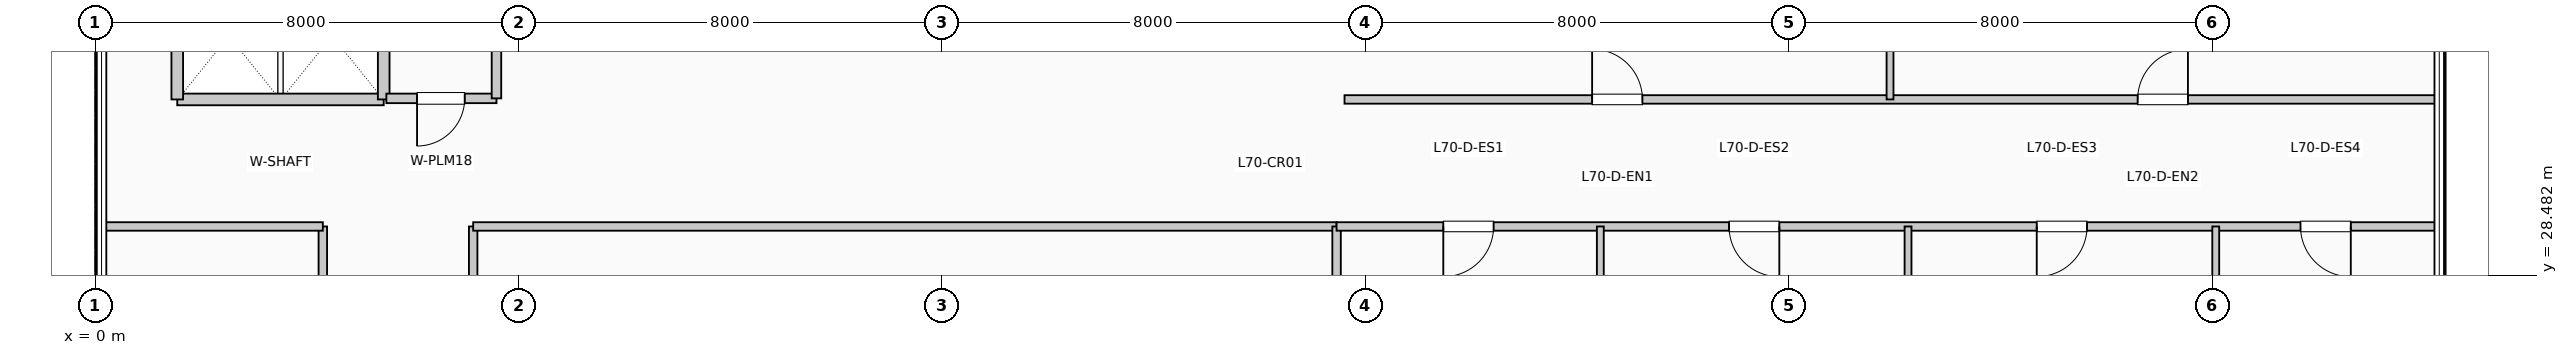
"""IFC4 building model, lengths in metres.
Left out: names, types, materials, properties, quantities, classifications, styles, units other than length and angle.
Written with IfcOpenShell. Run it as: python <this file> out.ifc"""

import sys

from ifc_helpers import new_model, si_unit, direction, frame, frame_2d, origin, place, context, subcontext, project, spatial, rectangle, extrude, element, fill, save


model = new_model("IFC4")
c1 = context("Model", 3, precision=1e-05, world=origin(), true_north=direction((0.0, 1.0)))
c2 = subcontext(c1, "Body", "Model", "MODEL_VIEW")
j1 = project(units=[si_unit("LENGTHUNIT", "METRE"), si_unit("PLANEANGLEUNIT", "RADIAN")], contexts=[c1])
p1 = place(None, origin())
s1 = spatial("IfcSite", under=j1, at=p1, CompositionType="ELEMENT")
p2 = place(p1, origin())
s2 = spatial("IfcBuilding", under=s1, at=p2, CompositionType="ELEMENT")
p3 = place(p2, frame((0.0, 0.0, 288.09)))
s3 = spatial("IfcBuildingStorey", under=s2, at=p3, CompositionType="ELEMENT", Elevation=288.09)
p4 = place(p3, frame((1.55, 31.8, 0.0), z_axis=(0.0, 0.0, 1.0), x_axis=(1.0, 0.0, 0.0)))
e1 = element("IfcWall", 1, at=p4, inside=s3, PredefinedType="PARTITIONING", context=c2, shape_type="SweptSolid", body=[
    extrude(rectangle(XDim=3.9, YDim=0.22, at=frame_2d((1.95, 0.0))), origin(), (0.0, 0.0, 1.0), 3.74),
])
for number, where, z_axis, x_axis in (
    (2, (1.55, 31.8, 0.0), (0.0, 0.0, 1.0), (0.0, 1.0, 0.0)),
    (3, (5.45, 31.8, 0.0), (0.0, 0.0, 1.0), (0.0, 1.0, 0.0)),
):
    element("IfcWall", number, at=place(p3, frame(where, z_axis=z_axis, x_axis=x_axis)), inside=s3, PredefinedType="PARTITIONING", context=c2, shape_type="SweptSolid", body=[
        extrude(rectangle(XDim=2.38, YDim=0.22, at=frame_2d((1.19, 0.0))), origin(), (0.0, 0.0, 1.0), 3.74),
    ])
p5 = place(p3, frame((5.5, 31.82, 0.0), z_axis=(0.0, 0.0, 1.0), x_axis=(1.0, 0.0, 0.0)))
e4 = element("IfcWall", 4, at=p5, inside=s3, PredefinedType="PLUMBINGWALL", context=c2, shape_type="SweptSolid", body=[
    extrude(rectangle(XDim=2.08, YDim=0.18, at=frame_2d((1.04, 0.0))), origin(), (0.0, 0.0, 1.0), 3.74),
])
p6 = place(p5, frame((1.48, 0.0, 0.0), z_axis=(0.0, 0.0, 1.0), x_axis=(-1.0, 0.0, 0.0)))
e5 = element("IfcOpeningElement", 5, at=p6, cuts=e4, PredefinedType="OPENING", context=c2, shape_type="SweptSolid", body=[
    extrude(rectangle(XDim=0.9, YDim=2.1, at=frame_2d((0.45, 1.05))), frame((0.0, 0.1, 0.0), z_axis=(0.0, -1.0, 0.0), x_axis=(1.0, 0.0, 0.0)), (0.0, 0.0, 1.0), 0.2),
])
p7 = place(p3, frame((7.58, 31.82, 0.0), z_axis=(0.0, 0.0, 1.0), x_axis=(0.0, 1.0, 0.0)))
e6 = element("IfcWall", 6, at=p7, inside=s3, PredefinedType="PLUMBINGWALL", context=c2, shape_type="SweptSolid", body=[
    extrude(rectangle(XDim=2.36, YDim=0.18, at=frame_2d((1.18, 0.0))), origin(), (0.0, 0.0, 1.0), 3.74),
])
p8 = place(p3, frame((4.3, 12.8, 0.0), z_axis=(0.0, 0.0, 1.0), x_axis=(0.0, 1.0, 0.0)))
e7 = element("IfcWall", 7, at=p8, inside=s3, PredefinedType="PARTITIONING", context=c2, shape_type="SweptSolid", body=[
    extrude(rectangle(XDim=16.6, YDim=0.16, at=frame_2d((8.3, 0.0))), origin(), (0.0, 0.0, 1.0), 3.74),
])
p9 = place(p8, frame((8.775, 0.0, 0.0), z_axis=(0.0, 0.0, 1.0), x_axis=(-1.0, 0.0, 0.0)))
e8 = element("IfcOpeningElement", 8, at=p9, cuts=e7, PredefinedType="OPENING", context=c2, shape_type="SweptSolid", body=[
    extrude(rectangle(XDim=0.95, YDim=2.15, at=frame_2d((0.475, 1.075))), frame((0.0, 0.09, 0.0), z_axis=(0.0, -1.0, 0.0), x_axis=(1.0, 0.0, 0.0)), (0.0, 0.0, 1.0), 0.18),
])
p10 = place(p3, frame((7.14, 12.8, 0.0), z_axis=(0.0, 0.0, 1.0), x_axis=(0.0, 1.0, 0.0)))
e9 = element("IfcWall", 9, at=p10, inside=s3, PredefinedType="PARTITIONING", context=c2, shape_type="SweptSolid", body=[
    extrude(rectangle(XDim=16.6, YDim=0.16, at=frame_2d((8.3, 0.0))), origin(), (0.0, 0.0, 1.0), 3.74),
])
p11 = place(p10, frame((1.849, 0.0, 0.0)))
e10 = element("IfcOpeningElement", 10, at=p11, cuts=e9, PredefinedType="OPENING", context=c2, shape_type="SweptSolid", body=[
    extrude(rectangle(XDim=0.95, YDim=2.15, at=frame_2d((0.475, 1.075))), frame((0.0, 0.09, 0.0), z_axis=(0.0, -1.0, 0.0), x_axis=(1.0, 0.0, 0.0)), (0.0, 0.0, 1.0), 0.18),
])
p12 = place(p10, frame((6.829, 0.0, 0.0)))
e11 = element("IfcOpeningElement", 11, at=p12, cuts=e9, PredefinedType="OPENING", context=c2, shape_type="SweptSolid", body=[
    extrude(rectangle(XDim=0.95, YDim=2.15, at=frame_2d((0.475, 1.075))), frame((0.0, 0.09, 0.0), z_axis=(0.0, -1.0, 0.0), x_axis=(1.0, 0.0, 0.0)), (0.0, 0.0, 1.0), 0.18),
])
p13 = place(p10, frame((12.805, 0.0, 0.0)))
e12 = element("IfcOpeningElement", 12, at=p13, cuts=e9, PredefinedType="OPENING", context=c2, shape_type="SweptSolid", body=[
    extrude(rectangle(XDim=0.95, YDim=2.15, at=frame_2d((0.475, 1.075))), frame((0.0, 0.09, 0.0), z_axis=(0.0, -1.0, 0.0), x_axis=(1.0, 0.0, 0.0)), (0.0, 0.0, 1.0), 0.18),
])
p14 = place(p3, frame((0.19, 29.4, 0.0), z_axis=(0.0, 0.0, 1.0), x_axis=(1.0, 0.0, 0.0)))
e13 = element("IfcWall", 13, at=p14, inside=s3, PredefinedType="PARTITIONING", context=c2, shape_type="SweptSolid", body=[
    extrude(rectangle(XDim=4.11, YDim=0.16, at=frame_2d((2.055, 0.0))), origin(), (0.0, 0.0, 1.0), 3.425),
])
p15 = place(p3, frame((7.14, 29.4, 0.0), z_axis=(0.0, 0.0, 1.0), x_axis=(1.0, 0.0, 0.0)))
e14 = element("IfcWall", 14, at=p15, inside=s3, PredefinedType="PARTITIONING", context=c2, shape_type="SweptSolid", body=[
    extrude(rectangle(XDim=16.31, YDim=0.16, at=frame_2d((8.155, 0.0))), origin(), (0.0, 0.0, 1.0), 3.425),
])
p16 = place(p3, frame((23.45, 5.99, 0.0), z_axis=(0.0, 0.0, 1.0), x_axis=(0.0, 1.0, 0.0)))
e15 = element("IfcWall", 15, at=p16, inside=s3, PredefinedType="PARTITIONING", context=c2, shape_type="SweptSolid", body=[
    extrude(rectangle(XDim=23.41, YDim=0.16, at=frame_2d((11.705, 0.0))), origin(), (0.0, 0.0, 1.0), 3.175),
])
p17 = place(p3, frame((23.45, 29.4, 0.0), z_axis=(0.0, 0.0, 1.0), x_axis=(1.0, 0.0, 0.0)))
e16 = element("IfcWall", 16, at=p17, inside=s3, PredefinedType="PARTITIONING", context=c2, shape_type="SweptSolid", body=[
    extrude(rectangle(XDim=20.76, YDim=0.16, at=frame_2d((10.38, 0.0))), origin(), (0.0, 0.0, 1.0), 3.425),
])
p18 = place(p17, frame((2.966, 0.0, 0.0), z_axis=(0.0, 0.0, 1.0), x_axis=(-1.0, 0.0, 0.0)))
e17 = element("IfcOpeningElement", 17, at=p18, cuts=e16, PredefinedType="OPENING", context=c2, shape_type="SweptSolid", body=[
    extrude(rectangle(XDim=0.95, YDim=2.15, at=frame_2d((0.475, 1.075))), frame((0.0, 0.09, 0.0), z_axis=(0.0, -1.0, 0.0), x_axis=(1.0, 0.0, 0.0)), (0.0, 0.0, 1.0), 0.18),
])
p19 = place(p17, frame((8.364, 0.0, 0.0), z_axis=(0.0, 0.0, 1.0), x_axis=(-1.0, 0.0, 0.0)))
e18 = element("IfcOpeningElement", 18, at=p19, cuts=e16, PredefinedType="OPENING", context=c2, shape_type="SweptSolid", body=[
    extrude(rectangle(XDim=0.95, YDim=2.15, at=frame_2d((0.475, 1.075))), frame((0.0, 0.09, 0.0), z_axis=(0.0, -1.0, 0.0), x_axis=(1.0, 0.0, 0.0)), (0.0, 0.0, 1.0), 0.18),
])
p20 = place(p17, frame((14.177, 0.0, 0.0), z_axis=(0.0, 0.0, 1.0), x_axis=(-1.0, 0.0, 0.0)))
e19 = element("IfcOpeningElement", 19, at=p20, cuts=e16, PredefinedType="OPENING", context=c2, shape_type="SweptSolid", body=[
    extrude(rectangle(XDim=0.95, YDim=2.15, at=frame_2d((0.475, 1.075))), frame((0.0, 0.09, 0.0), z_axis=(0.0, -1.0, 0.0), x_axis=(1.0, 0.0, 0.0)), (0.0, 0.0, 1.0), 0.18),
])
p21 = place(p17, frame((19.159, 0.0, 0.0), z_axis=(0.0, 0.0, 1.0), x_axis=(-1.0, 0.0, 0.0)))
e20 = element("IfcOpeningElement", 20, at=p21, cuts=e16, PredefinedType="OPENING", context=c2, shape_type="SweptSolid", body=[
    extrude(rectangle(XDim=0.95, YDim=2.15, at=frame_2d((0.475, 1.075))), frame((0.0, 0.09, 0.0), z_axis=(0.0, -1.0, 0.0), x_axis=(1.0, 0.0, 0.0)), (0.0, 0.0, 1.0), 0.18),
])
p22 = place(p3, frame((23.6, 31.8, 0.0), z_axis=(0.0, 0.0, 1.0), x_axis=(1.0, 0.0, 0.0)))
e21 = element("IfcWall", 21, at=p22, inside=s3, PredefinedType="PARTITIONING", context=c2, shape_type="SweptSolid", body=[
    extrude(rectangle(XDim=20.61, YDim=0.16, at=frame_2d((10.305, 0.0))), origin(), (0.0, 0.0, 1.0), 3.74),
])
p23 = place(p22, frame((4.677, 0.0, 0.0)))
e22 = element("IfcOpeningElement", 22, at=p23, cuts=e21, PredefinedType="OPENING", context=c2, shape_type="SweptSolid", body=[
    extrude(rectangle(XDim=0.95, YDim=2.15, at=frame_2d((0.475, 1.075))), frame((0.0, 0.09, 0.0), z_axis=(0.0, -1.0, 0.0), x_axis=(1.0, 0.0, 0.0)), (0.0, 0.0, 1.0), 0.18),
])
p24 = place(p22, frame((14.982, 0.0, 0.0)))
e23 = element("IfcOpeningElement", 23, at=p24, cuts=e21, PredefinedType="OPENING", context=c2, shape_type="SweptSolid", body=[
    extrude(rectangle(XDim=0.95, YDim=2.15, at=frame_2d((0.475, 1.075))), frame((0.0, 0.09, 0.0), z_axis=(0.0, -1.0, 0.0), x_axis=(1.0, 0.0, 0.0)), (0.0, 0.0, 1.0), 0.18),
])
for number, where, z_axis, x_axis in (
    (24, (28.432, 25.19, 0.0), (0.0, 0.0, 1.0), (0.0, 1.0, 0.0)),
    (25, (34.245, 25.19, 0.0), (0.0, 0.0, 1.0), (0.0, 1.0, 0.0)),
):
    element("IfcWall", number, at=place(p3, frame(where, z_axis=z_axis, x_axis=x_axis)), inside=s3, PredefinedType="PARTITIONING", context=c2, shape_type="SweptSolid", body=[
        extrude(rectangle(XDim=4.21, YDim=0.13, at=frame_2d((2.105, 0.0))), origin(), (0.0, 0.0, 1.0), 3.74),
    ])
p25 = place(p3, frame((40.058, 25.19, 0.0), z_axis=(0.0, 0.0, 1.0), x_axis=(0.0, 1.0, 0.0)))
e26 = element("IfcWall", 26, at=p25, inside=s3, PredefinedType="PARTITIONING", context=c2, shape_type="SweptSolid", body=[
    extrude(rectangle(XDim=4.21, YDim=0.13, at=frame_2d((2.105, 0.0))), origin(), (0.0, 0.0, 1.0), 3.175),
])
p26 = place(p3, frame((33.905, 31.8, 0.0), z_axis=(0.0, 0.0, 1.0), x_axis=(0.0, 1.0, 0.0)))
e27 = element("IfcWall", 27, at=p26, inside=s3, PredefinedType="PARTITIONING", context=c2, shape_type="SweptSolid", body=[
    extrude(rectangle(XDim=14.01, YDim=0.13, at=frame_2d((7.005, 0.0))), origin(), (0.0, 0.0, 1.0), 3.74),
])
p27 = place(p6, origin())
e28 = element("IfcDoor", 28, at=p27, inside=s3, OperationType="SINGLE_SWING_LEFT", PredefinedType="DOOR", context=c2, shape_type="SweptSolid", body=[
    extrude(rectangle(XDim=0.9, YDim=2.1, at=frame_2d((0.45, 1.05))), frame((0.0, 0.025, 0.0), z_axis=(0.0, -1.0, 0.0), x_axis=(1.0, 0.0, 0.0)), (0.0, 0.0, 1.0), 0.05),
])
fill(e5, e28)
p28 = place(p18, origin())
e29 = element("IfcDoor", 29, at=p28, inside=s3, OperationType="SINGLE_SWING_LEFT", PredefinedType="DOOR", context=c2, shape_type="SweptSolid", body=[
    extrude(rectangle(XDim=0.95, YDim=2.15, at=frame_2d((0.475, 1.075))), frame((0.0, 0.025, 0.0), z_axis=(0.0, -1.0, 0.0), x_axis=(1.0, 0.0, 0.0)), (0.0, 0.0, 1.0), 0.05),
])
fill(e17, e29)
p29 = place(p19, origin())
e30 = element("IfcDoor", 30, at=p29, inside=s3, OperationType="SINGLE_SWING_RIGHT", PredefinedType="DOOR", context=c2, shape_type="SweptSolid", body=[
    extrude(rectangle(XDim=0.95, YDim=2.15, at=frame_2d((0.475, 1.075))), frame((0.0, 0.025, 0.0), z_axis=(0.0, -1.0, 0.0), x_axis=(1.0, 0.0, 0.0)), (0.0, 0.0, 1.0), 0.05),
])
fill(e18, e30)
p30 = place(p20, origin())
e31 = element("IfcDoor", 31, at=p30, inside=s3, OperationType="SINGLE_SWING_LEFT", PredefinedType="DOOR", context=c2, shape_type="SweptSolid", body=[
    extrude(rectangle(XDim=0.95, YDim=2.15, at=frame_2d((0.475, 1.075))), frame((0.0, 0.025, 0.0), z_axis=(0.0, -1.0, 0.0), x_axis=(1.0, 0.0, 0.0)), (0.0, 0.0, 1.0), 0.05),
])
fill(e19, e31)
p31 = place(p21, origin())
e32 = element("IfcDoor", 32, at=p31, inside=s3, OperationType="SINGLE_SWING_RIGHT", PredefinedType="DOOR", context=c2, shape_type="SweptSolid", body=[
    extrude(rectangle(XDim=0.95, YDim=2.15, at=frame_2d((0.475, 1.075))), frame((0.0, 0.025, 0.0), z_axis=(0.0, -1.0, 0.0), x_axis=(1.0, 0.0, 0.0)), (0.0, 0.0, 1.0), 0.05),
])
fill(e20, e32)
p32 = place(p23, origin())
e33 = element("IfcDoor", 33, at=p32, inside=s3, OperationType="SINGLE_SWING_LEFT", PredefinedType="DOOR", context=c2, shape_type="SweptSolid", body=[
    extrude(rectangle(XDim=0.95, YDim=2.15, at=frame_2d((0.475, 1.075))), frame((0.0, 0.025, 0.0), z_axis=(0.0, -1.0, 0.0), x_axis=(1.0, 0.0, 0.0)), (0.0, 0.0, 1.0), 0.05),
])
fill(e22, e33)
p33 = place(p24, origin())
e34 = element("IfcDoor", 34, at=p33, inside=s3, OperationType="SINGLE_SWING_RIGHT", PredefinedType="DOOR", context=c2, shape_type="SweptSolid", body=[
    extrude(rectangle(XDim=0.95, YDim=2.15, at=frame_2d((0.475, 1.075))), frame((0.0, 0.025, 0.0), z_axis=(0.0, -1.0, 0.0), x_axis=(1.0, 0.0, 0.0)), (0.0, 0.0, 1.0), 0.05),
])
fill(e23, e34)
save(model, sys.argv[1])
